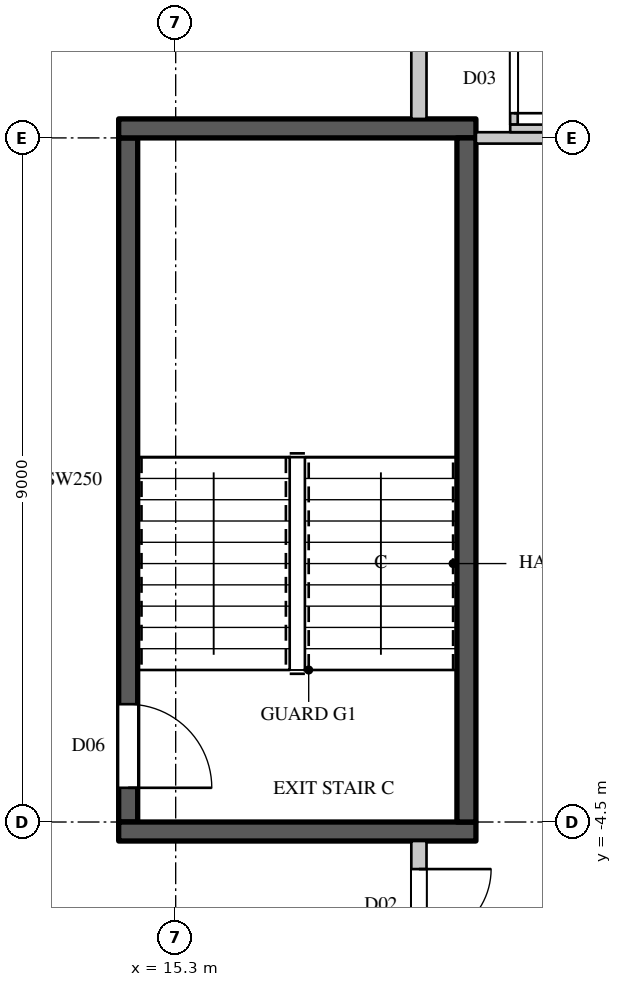
"""IFC4 building model, lengths in metres.
Left out: names, types, materials, properties, quantities, classifications, styles, units other than length and angle.
Written with IfcOpenShell. Run it as: python <this file> out.ifc"""

import sys

from ifc_helpers import new_model, si_unit, direction, frame, frame_2d, origin, place, context, subcontext, project, spatial, rectangle, extrude, element, fill, save


model = new_model("IFC4")
c1 = context("Model", 3, precision=1e-05, world=origin(), true_north=direction((0.0, 1.0)))
c2 = subcontext(c1, "Body", "Model", "MODEL_VIEW")
j1 = project(units=[si_unit("LENGTHUNIT", "METRE"), si_unit("PLANEANGLEUNIT", "RADIAN")], contexts=[c1])
p1 = place(None, origin())
s1 = spatial("IfcSite", under=j1, at=p1, CompositionType="ELEMENT")
p2 = place(p1, origin())
s2 = spatial("IfcBuilding", under=s1, at=p2, CompositionType="ELEMENT")
p3 = place(p2, frame((0.0, 0.0, 102.3)))
s3 = spatial("IfcBuildingStorey", under=s2, at=p3, CompositionType="ELEMENT", Elevation=102.3)
p4 = place(p3, frame((18.5, -18.869, 0.0), z_axis=(0.0, 0.0, 1.0), x_axis=(0.0, 1.0, 0.0)))
e1 = element("IfcWall", 1, at=p4, inside=s3, PredefinedType="PARTITIONING", context=c2, shape_type="SweptSolid", body=[
    extrude(rectangle(XDim=14.119, YDim=0.2, at=frame_2d((7.06, 0.0))), origin(), (0.0, 0.0, 1.0), 3.3),
])
p5 = place(p4, frame((3.4, 0.0, 0.0)))
e2 = element("IfcOpeningElement", 2, at=p5, cuts=e1, PredefinedType="OPENING", context=c2, shape_type="SweptSolid", body=[
    extrude(rectangle(XDim=0.95, YDim=2.2, at=frame_2d((0.475, 1.1))), frame((0.0, 0.11, 0.0), z_axis=(0.0, -1.0, 0.0), x_axis=(1.0, 0.0, 0.0)), (0.0, 0.0, 1.0), 0.22),
])
p6 = place(p4, frame((12.8, 0.0, 0.0)))
e3 = element("IfcOpeningElement", 3, at=p6, cuts=e1, PredefinedType="OPENING", context=c2, shape_type="SweptSolid", body=[
    extrude(rectangle(XDim=0.95, YDim=2.2, at=frame_2d((0.475, 1.1))), frame((0.0, 0.11, 0.0), z_axis=(0.0, -1.0, 0.0), x_axis=(1.0, 0.0, 0.0)), (0.0, 0.0, 1.0), 0.22),
])
p7 = place(p3, frame((18.5, 4.75, 0.0), z_axis=(0.0, 0.0, 1.0), x_axis=(0.0, 1.0, 0.0)))
e4 = element("IfcWall", 4, at=p7, inside=s3, PredefinedType="PARTITIONING", context=c2, shape_type="SweptSolid", body=[
    extrude(rectangle(XDim=14.434, YDim=0.2, at=frame_2d((7.217, 0.0))), origin(), (0.0, 0.0, 1.0), 3.3),
])
p8 = place(p7, frame((7.65, 0.0, 0.0)))
e5 = element("IfcOpeningElement", 5, at=p8, cuts=e4, PredefinedType="OPENING", context=c2, shape_type="SweptSolid", body=[
    extrude(rectangle(XDim=0.95, YDim=2.2, at=frame_2d((0.475, 1.1))), frame((0.0, 0.11, 0.0), z_axis=(0.0, -1.0, 0.0), x_axis=(1.0, 0.0, 0.0)), (0.0, 0.0, 1.0), 0.22),
])
p9 = place(p3, frame((19.25, 4.5, 0.0), z_axis=(0.0, 0.0, 1.0), x_axis=(1.0, 0.0, 0.0)))
e6 = element("IfcWall", 6, at=p9, inside=s3, PredefinedType="PARTITIONING", context=c2, shape_type="SweptSolid", body=[
    extrude(rectangle(XDim=4.1, YDim=0.15, at=frame_2d((2.05, 0.0))), origin(), (0.0, 0.0, 1.0), 3.3),
])
p10 = place(p3, frame((14.675, -4.5, 0.0), z_axis=(0.0, 0.0, 1.0), x_axis=(0.0, 1.0, 0.0)))
e7 = element("IfcWall", 7, at=p10, inside=s3, PredefinedType="SHEAR", context=c2, shape_type="SweptSolid", body=[
    extrude(rectangle(XDim=9.0, YDim=0.25, at=frame_2d((4.5, 0.0))), origin(), (0.0, 0.0, 1.0), 3.3),
])
p11 = place(p10, frame((0.45, 0.0, 0.0)))
e8 = element("IfcOpeningElement", 8, at=p11, cuts=e7, PredefinedType="OPENING", context=c2, shape_type="SweptSolid", body=[
    extrude(rectangle(XDim=1.1, YDim=2.2, at=frame_2d((0.55, 1.1))), frame((0.0, 0.135, 0.0), z_axis=(0.0, -1.0, 0.0), x_axis=(1.0, 0.0, 0.0)), (0.0, 0.0, 1.0), 0.27),
])
for number, where, z_axis, x_axis in (
    (9, (14.55, -4.625, 0.0), (0.0, 0.0, 1.0), (1.0, 0.0, 0.0)),
    (10, (14.55, 4.625, 0.0), (0.0, 0.0, 1.0), (1.0, 0.0, 0.0)),
):
    element("IfcWall", number, at=place(p3, frame(where, z_axis=z_axis, x_axis=x_axis)), inside=s3, PredefinedType="SHEAR", context=c2, shape_type="SweptSolid", body=[
        extrude(rectangle(XDim=4.7, YDim=0.25, at=frame_2d((2.35, 0.0))), origin(), (0.0, 0.0, 1.0), 3.3),
    ])
p12 = place(p3, frame((19.125, -4.5, 0.0), z_axis=(0.0, 0.0, 1.0), x_axis=(0.0, 1.0, 0.0)))
e11 = element("IfcWall", 11, at=p12, inside=s3, PredefinedType="SHEAR", context=c2, shape_type="SweptSolid", body=[
    extrude(rectangle(XDim=9.0, YDim=0.25, at=frame_2d((4.5, 0.0))), origin(), (0.0, 0.0, 1.0), 3.3),
])
p13 = place(p3, frame((19.75, 4.675, 0.0), z_axis=(0.0, 0.0, 1.0), x_axis=(0.0, 1.0, 0.0)))
e12 = element("IfcWall", 12, at=p13, inside=s3, PredefinedType="PARTITIONING", context=c2, shape_type="SweptSolid", body=[
    extrude(rectangle(XDim=2.3, YDim=0.1, at=frame_2d((1.15, 0.0))), origin(), (0.0, 0.0, 1.0), 3.3),
])
p14 = place(p13, frame((0.15, 0.0, 0.0)))
e13 = element("IfcOpeningElement", 13, at=p14, cuts=e12, PredefinedType="OPENING", context=c2, shape_type="SweptSolid", body=[
    extrude(rectangle(XDim=0.9, YDim=2.2, at=frame_2d((0.45, 1.1))), frame((0.0, 0.06, 0.0), z_axis=(0.0, -1.0, 0.0), x_axis=(1.0, 0.0, 0.0)), (0.0, 0.0, 1.0), 0.12),
])
p15 = place(p3, frame((19.701, 4.625, 0.0), z_axis=(0.0, 0.0, 1.0), x_axis=(1.0, 0.0, 0.0)))
e14 = element("IfcWall", 14, at=p15, inside=s3, PredefinedType="PARTITIONING", context=c2, shape_type="SweptSolid", body=[
    extrude(rectangle(XDim=2.8, YDim=0.1, at=frame_2d((1.4, 0.0))), origin(), (0.0, 0.0, 1.0), 3.3),
])
p16 = place(p6, origin())
e15 = element("IfcDoor", 15, at=p16, inside=s3, OperationType="SINGLE_SWING_LEFT", PredefinedType="DOOR", context=c2, shape_type="SweptSolid", body=[
    extrude(rectangle(XDim=0.95, YDim=2.2, at=frame_2d((0.475, 1.1))), frame((0.0, 0.025, 0.0), z_axis=(0.0, -1.0, 0.0), x_axis=(1.0, 0.0, 0.0)), (0.0, 0.0, 1.0), 0.05),
])
fill(e3, e15)
p17 = place(p14, origin())
e16 = element("IfcDoor", 16, at=p17, inside=s3, OperationType="SINGLE_SWING_RIGHT", PredefinedType="DOOR", context=c2, shape_type="SweptSolid", body=[
    extrude(rectangle(XDim=0.9, YDim=2.2, at=frame_2d((0.45, 1.1))), frame((0.0, 0.025, 0.0), z_axis=(0.0, -1.0, 0.0), x_axis=(1.0, 0.0, 0.0)), (0.0, 0.0, 1.0), 0.05),
])
fill(e13, e16)
p18 = place(p11, origin())
e17 = element("IfcDoor", 17, at=p18, inside=s3, OperationType="SINGLE_SWING_RIGHT", PredefinedType="DOOR", context=c2, shape_type="SweptSolid", body=[
    extrude(rectangle(XDim=1.1, YDim=2.2, at=frame_2d((0.55, 1.1))), frame((0.0, 0.025, 0.0), z_axis=(0.0, -1.0, 0.0), x_axis=(1.0, 0.0, 0.0)), (0.0, 0.0, 1.0), 0.05),
])
fill(e8, e17)
save(model, sys.argv[1])
